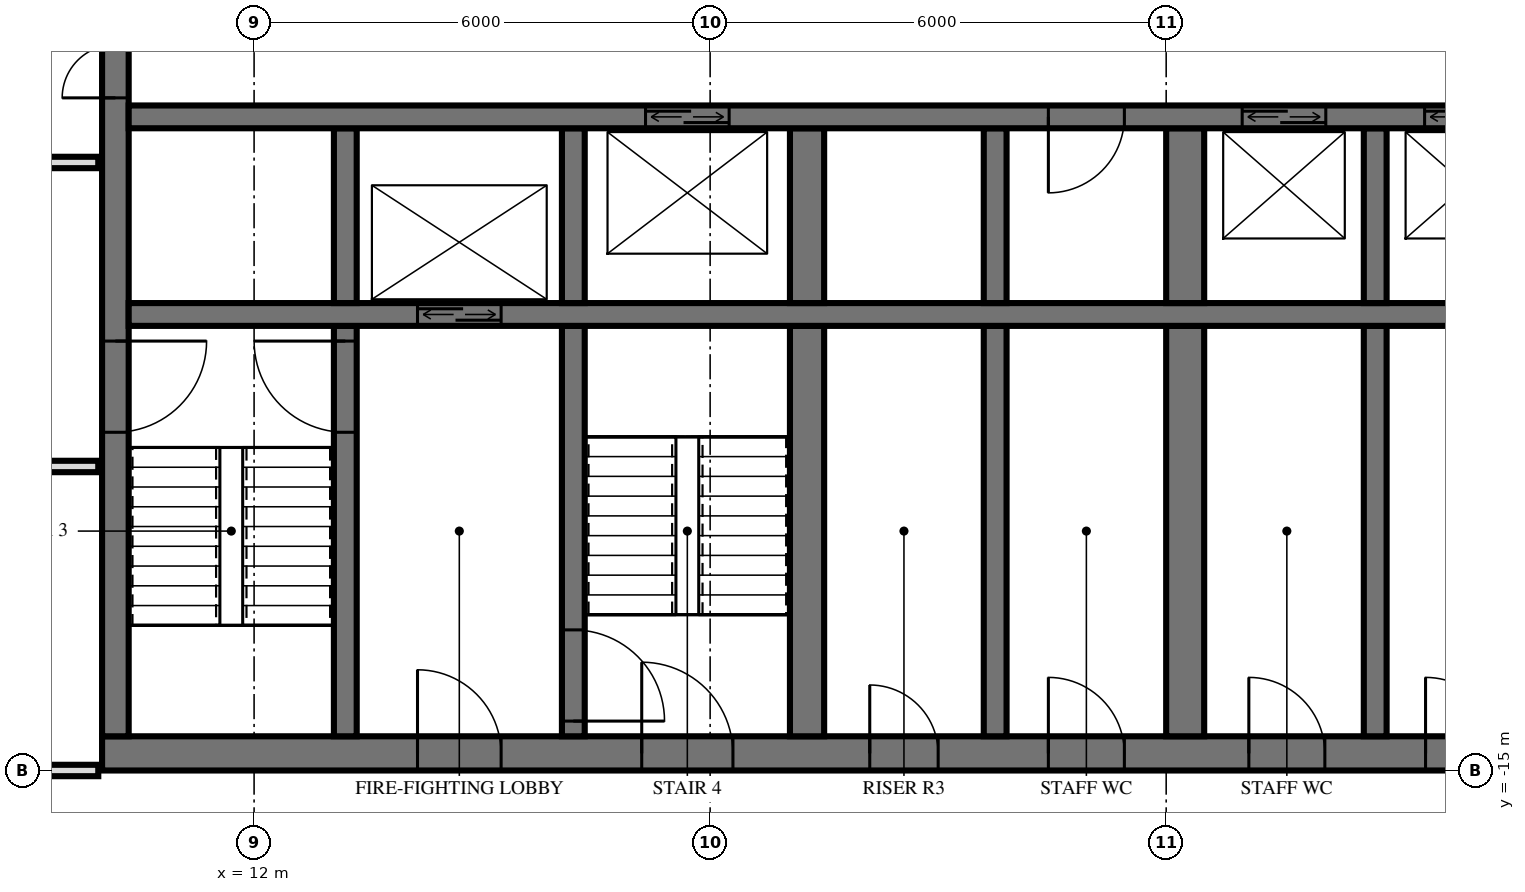
"""IFC4 building model, lengths in metres.
Left out: names, types, materials, properties, quantities, classifications, styles, units other than length and angle.
Written with IfcOpenShell. Run it as: python <this file> out.ifc"""

import sys

from ifc_helpers import new_model, si_unit, direction, frame, frame_2d, origin, place, context, subcontext, project, spatial, rectangle, extrude, element, fill, save


model = new_model("IFC4")
c1 = context("Model", 3, precision=1e-05, world=origin(), true_north=direction((0.0, 1.0)))
c2 = subcontext(c1, "Body", "Model", "MODEL_VIEW")
j1 = project(units=[si_unit("LENGTHUNIT", "METRE"), si_unit("PLANEANGLEUNIT", "RADIAN")], contexts=[c1])
p1 = place(None, origin())
s1 = spatial("IfcSite", under=j1, at=p1, CompositionType="ELEMENT")
p2 = place(p1, origin())
s2 = spatial("IfcBuilding", under=s1, at=p2, CompositionType="ELEMENT")
p3 = place(p2, frame((0.0, 0.0, 60.0)))
s3 = spatial("IfcBuildingStorey", under=s2, at=p3, CompositionType="ELEMENT", Elevation=60.0)
p4 = place(p3, frame((10.0, -14.775, 0.0), z_axis=(0.0, 0.0, 1.0), x_axis=(1.0, 0.0, 0.0)))
e1 = element("IfcWall", 1, at=p4, inside=s3, PredefinedType="SHEAR", context=c2, shape_type="SweptSolid", body=[
    extrude(rectangle(XDim=19.5, YDim=0.45, at=frame_2d((9.75, 0.0))), origin(), (0.0, 0.0, 1.0), 3.6),
])
p5 = place(p4, frame((7.1, 0.0, 0.0)))
e2 = element("IfcOpeningElement", 2, at=p5, cuts=e1, PredefinedType="OPENING", context=c2, shape_type="SweptSolid", body=[
    extrude(rectangle(XDim=1.2, YDim=2.1, at=frame_2d((0.6, 1.05))), frame((0.0, 0.235, 0.0), z_axis=(0.0, -1.0, 0.0), x_axis=(1.0, 0.0, 0.0)), (0.0, 0.0, 1.0), 0.47),
])
p6 = place(p4, frame((4.15, 0.0, 0.0)))
e3 = element("IfcOpeningElement", 3, at=p6, cuts=e1, PredefinedType="OPENING", context=c2, shape_type="SweptSolid", body=[
    extrude(rectangle(XDim=1.1, YDim=2.1, at=frame_2d((0.55, 1.05))), frame((0.0, 0.235, 0.0), z_axis=(0.0, -1.0, 0.0), x_axis=(1.0, 0.0, 0.0)), (0.0, 0.0, 1.0), 0.47),
])
p7 = place(p4, frame((10.1, 0.0, 0.0)))
e4 = element("IfcOpeningElement", 4, at=p7, cuts=e1, PredefinedType="OPENING", context=c2, shape_type="SweptSolid", body=[
    extrude(rectangle(XDim=0.9, YDim=2.1, at=frame_2d((0.45, 1.05))), frame((0.0, 0.235, 0.0), z_axis=(0.0, -1.0, 0.0), x_axis=(1.0, 0.0, 0.0)), (0.0, 0.0, 1.0), 0.47),
])
p8 = place(p4, frame((12.45, 0.0, 0.0)))
e5 = element("IfcOpeningElement", 5, at=p8, cuts=e1, PredefinedType="OPENING", context=c2, shape_type="SweptSolid", body=[
    extrude(rectangle(XDim=1.0, YDim=2.1, at=frame_2d((0.5, 1.05))), frame((0.0, 0.235, 0.0), z_axis=(0.0, -1.0, 0.0), x_axis=(1.0, 0.0, 0.0)), (0.0, 0.0, 1.0), 0.47),
])
p9 = place(p4, frame((15.087, 0.0, 0.0)))
e6 = element("IfcOpeningElement", 6, at=p9, cuts=e1, PredefinedType="OPENING", context=c2, shape_type="SweptSolid", body=[
    extrude(rectangle(XDim=1.0, YDim=2.1, at=frame_2d((0.5, 1.05))), frame((0.0, 0.235, 0.0), z_axis=(0.0, -1.0, 0.0), x_axis=(1.0, 0.0, 0.0)), (0.0, 0.0, 1.0), 0.47),
])
p10 = place(p4, frame((17.413, 0.0, 0.0)))
e7 = element("IfcOpeningElement", 7, at=p10, cuts=e1, PredefinedType="OPENING", context=c2, shape_type="SweptSolid", body=[
    extrude(rectangle(XDim=1.0, YDim=2.1, at=frame_2d((0.5, 1.05))), frame((0.0, 0.235, 0.0), z_axis=(0.0, -1.0, 0.0), x_axis=(1.0, 0.0, 0.0)), (0.0, 0.0, 1.0), 0.47),
])
p11 = place(p3, frame((10.175, -14.55, 0.0), z_axis=(0.0, 0.0, 1.0), x_axis=(0.0, 1.0, 0.0)))
e8 = element("IfcWall", 8, at=p11, inside=s3, PredefinedType="SHEAR", context=c2, shape_type="SweptSolid", body=[
    extrude(rectangle(XDim=14.1, YDim=0.35, at=frame_2d((7.05, 0.0))), origin(), (0.0, 0.0, 1.0), 3.6),
])
p12 = place(p11, frame((8.4, 0.0, 0.0)))
e9 = element("IfcOpeningElement", 9, at=p12, cuts=e8, PredefinedType="OPENING", context=c2, shape_type="SweptSolid", body=[
    extrude(rectangle(XDim=1.4, YDim=2.4, at=frame_2d((0.7, 1.2))), frame((0.0, 0.185, 0.0), z_axis=(0.0, -1.0, 0.0), x_axis=(1.0, 0.0, 0.0)), (0.0, 0.0, 1.0), 0.37),
])
p13 = place(p11, frame((10.0, 0.0, 0.0)))
e10 = element("IfcOpeningElement", 10, at=p13, cuts=e8, PredefinedType="OPENING", context=c2, shape_type="SweptSolid", body=[
    extrude(rectangle(XDim=1.4, YDim=2.4, at=frame_2d((0.7, 1.2))), frame((0.0, 0.185, 0.0), z_axis=(0.0, -1.0, 0.0), x_axis=(1.0, 0.0, 0.0)), (0.0, 0.0, 1.0), 0.37),
])
p14 = place(p11, frame((4.0, 0.0, 0.0)))
e11 = element("IfcOpeningElement", 11, at=p14, cuts=e8, PredefinedType="OPENING", context=c2, shape_type="SweptSolid", body=[
    extrude(rectangle(XDim=1.2, YDim=2.1, at=frame_2d((0.6, 1.05))), frame((0.0, 0.185, 0.0), z_axis=(0.0, -1.0, 0.0), x_axis=(1.0, 0.0, 0.0)), (0.0, 0.0, 1.0), 0.37),
])
p15 = place(p3, frame((10.35, -6.4, 0.0), z_axis=(0.0, 0.0, 1.0), x_axis=(1.0, 0.0, 0.0)))
e12 = element("IfcWall", 12, at=p15, inside=s3, PredefinedType="SHEAR", context=c2, shape_type="SweptSolid", body=[
    extrude(rectangle(XDim=18.7, YDim=0.3, at=frame_2d((9.35, 0.0))), origin(), (0.0, 0.0, 1.0), 3.6),
])
p16 = place(p15, frame((14.65, 0.0, 0.0)))
e13 = element("IfcOpeningElement", 13, at=p16, cuts=e12, PredefinedType="OPENING", context=c2, shape_type="SweptSolid", body=[
    extrude(rectangle(XDim=1.1, YDim=2.1, at=frame_2d((0.55, 1.05))), frame((0.0, 0.16, 0.0), z_axis=(0.0, -1.0, 0.0), x_axis=(1.0, 0.0, 0.0)), (0.0, 0.0, 1.0), 0.32),
])
p17 = place(p15, frame((17.05, 0.0, 0.0)))
e14 = element("IfcOpeningElement", 14, at=p17, cuts=e12, PredefinedType="OPENING", context=c2, shape_type="SweptSolid", body=[
    extrude(rectangle(XDim=1.1, YDim=2.1, at=frame_2d((0.55, 1.05))), frame((0.0, 0.16, 0.0), z_axis=(0.0, -1.0, 0.0), x_axis=(1.0, 0.0, 0.0)), (0.0, 0.0, 1.0), 0.32),
])
p18 = place(p15, frame((6.8, 0.0, 0.0)))
e15 = element("IfcOpeningElement", 15, at=p18, cuts=e12, PredefinedType="OPENING", context=c2, shape_type="SweptSolid", body=[
    extrude(rectangle(XDim=1.1, YDim=2.1, at=frame_2d((0.55, 1.05))), frame((0.0, 0.16, 0.0), z_axis=(0.0, -1.0, 0.0), x_axis=(1.0, 0.0, 0.0)), (0.0, 0.0, 1.0), 0.32),
])
p19 = place(p15, frame((12.1, 0.0, 0.0)))
e16 = element("IfcOpeningElement", 16, at=p19, cuts=e12, PredefinedType="OPENING", context=c2, shape_type="SweptSolid", body=[
    extrude(rectangle(XDim=1.0, YDim=2.1, at=frame_2d((0.5, 1.05))), frame((0.0, 0.16, 0.0), z_axis=(0.0, -1.0, 0.0), x_axis=(1.0, 0.0, 0.0)), (0.0, 0.0, 1.0), 0.32),
])
p20 = place(p3, frame((10.35, -9.0, 0.0), z_axis=(0.0, 0.0, 1.0), x_axis=(1.0, 0.0, 0.0)))
e17 = element("IfcWall", 17, at=p20, inside=s3, PredefinedType="SHEAR", context=c2, shape_type="SweptSolid", body=[
    extrude(rectangle(XDim=18.7, YDim=0.3, at=frame_2d((9.35, 0.0))), origin(), (0.0, 0.0, 1.0), 3.6),
])
p21 = place(p20, frame((3.8, 0.0, 0.0)))
e18 = element("IfcOpeningElement", 18, at=p21, cuts=e17, PredefinedType="OPENING", context=c2, shape_type="SweptSolid", body=[
    extrude(rectangle(XDim=1.1, YDim=2.1, at=frame_2d((0.55, 1.05))), frame((0.0, 0.16, 0.0), z_axis=(0.0, -1.0, 0.0), x_axis=(1.0, 0.0, 0.0)), (0.0, 0.0, 1.0), 0.32),
])
p22 = place(p3, frame((13.2, -8.85, 0.0), z_axis=(0.0, 0.0, 1.0), x_axis=(0.0, 1.0, 0.0)))
e19 = element("IfcWall", 19, at=p22, inside=s3, PredefinedType="SHEAR", context=c2, shape_type="SweptSolid", body=[
    extrude(rectangle(XDim=2.3, YDim=0.3, at=frame_2d((1.15, 0.0))), origin(), (0.0, 0.0, 1.0), 3.6),
])
p23 = place(p3, frame((13.2, -14.55, 0.0), z_axis=(0.0, 0.0, 1.0), x_axis=(0.0, 1.0, 0.0)))
e20 = element("IfcWall", 20, at=p23, inside=s3, PredefinedType="SHEAR", context=c2, shape_type="SweptSolid", body=[
    extrude(rectangle(XDim=5.4, YDim=0.3, at=frame_2d((2.7, 0.0))), origin(), (0.0, 0.0, 1.0), 3.6),
])
p24 = place(p23, frame((4.0, 0.0, 0.0)))
e21 = element("IfcOpeningElement", 21, at=p24, cuts=e20, PredefinedType="OPENING", context=c2, shape_type="SweptSolid", body=[
    extrude(rectangle(XDim=1.2, YDim=2.1, at=frame_2d((0.6, 1.05))), frame((0.0, 0.16, 0.0), z_axis=(0.0, -1.0, 0.0), x_axis=(1.0, 0.0, 0.0)), (0.0, 0.0, 1.0), 0.32),
])
p25 = place(p3, frame((16.2, -8.85, 0.0), z_axis=(0.0, 0.0, 1.0), x_axis=(0.0, 1.0, 0.0)))
e22 = element("IfcWall", 22, at=p25, inside=s3, PredefinedType="SHEAR", context=c2, shape_type="SweptSolid", body=[
    extrude(rectangle(XDim=2.3, YDim=0.3, at=frame_2d((1.15, 0.0))), origin(), (0.0, 0.0, 1.0), 3.6),
])
p26 = place(p3, frame((16.2, -14.55, 0.0), z_axis=(0.0, 0.0, 1.0), x_axis=(0.0, 1.0, 0.0)))
e23 = element("IfcWall", 23, at=p26, inside=s3, PredefinedType="SHEAR", context=c2, shape_type="SweptSolid", body=[
    extrude(rectangle(XDim=5.4, YDim=0.3, at=frame_2d((2.7, 0.0))), origin(), (0.0, 0.0, 1.0), 3.6),
])
p27 = place(p26, frame((0.2, 0.0, 0.0)))
e24 = element("IfcOpeningElement", 24, at=p27, cuts=e23, PredefinedType="OPENING", context=c2, shape_type="SweptSolid", body=[
    extrude(rectangle(XDim=1.2, YDim=2.1, at=frame_2d((0.6, 1.05))), frame((0.0, 0.16, 0.0), z_axis=(0.0, -1.0, 0.0), x_axis=(1.0, 0.0, 0.0)), (0.0, 0.0, 1.0), 0.32),
])
p28 = place(p3, frame((19.275, -8.85, 0.0), z_axis=(0.0, 0.0, 1.0), x_axis=(0.0, 1.0, 0.0)))
e25 = element("IfcWall", 25, at=p28, inside=s3, PredefinedType="SHEAR", context=c2, shape_type="SweptSolid", body=[
    extrude(rectangle(XDim=2.3, YDim=0.45, at=frame_2d((1.15, 0.0))), origin(), (0.0, 0.0, 1.0), 3.6),
])
p29 = place(p3, frame((19.275, -14.55, 0.0), z_axis=(0.0, 0.0, 1.0), x_axis=(0.0, 1.0, 0.0)))
e26 = element("IfcWall", 26, at=p29, inside=s3, PredefinedType="SHEAR", context=c2, shape_type="SweptSolid", body=[
    extrude(rectangle(XDim=5.4, YDim=0.45, at=frame_2d((2.7, 0.0))), origin(), (0.0, 0.0, 1.0), 3.6),
])
p30 = place(p3, frame((21.75, -8.85, 0.0), z_axis=(0.0, 0.0, 1.0), x_axis=(0.0, 1.0, 0.0)))
e27 = element("IfcWall", 27, at=p30, inside=s3, PredefinedType="SHEAR", context=c2, shape_type="SweptSolid", body=[
    extrude(rectangle(XDim=2.3, YDim=0.3, at=frame_2d((1.15, 0.0))), origin(), (0.0, 0.0, 1.0), 3.6),
])
p31 = place(p3, frame((21.75, -14.55, 0.0), z_axis=(0.0, 0.0, 1.0), x_axis=(0.0, 1.0, 0.0)))
e28 = element("IfcWall", 28, at=p31, inside=s3, PredefinedType="SHEAR", context=c2, shape_type="SweptSolid", body=[
    extrude(rectangle(XDim=5.4, YDim=0.3, at=frame_2d((2.7, 0.0))), origin(), (0.0, 0.0, 1.0), 3.6),
])
p32 = place(p3, frame((24.25, -8.85, 0.0), z_axis=(0.0, 0.0, 1.0), x_axis=(0.0, 1.0, 0.0)))
e29 = element("IfcWall", 29, at=p32, inside=s3, PredefinedType="SHEAR", context=c2, shape_type="SweptSolid", body=[
    extrude(rectangle(XDim=2.3, YDim=0.5, at=frame_2d((1.15, 0.0))), origin(), (0.0, 0.0, 1.0), 3.6),
])
p33 = place(p3, frame((24.25, -14.55, 0.0), z_axis=(0.0, 0.0, 1.0), x_axis=(0.0, 1.0, 0.0)))
e30 = element("IfcWall", 30, at=p33, inside=s3, PredefinedType="SHEAR", context=c2, shape_type="SweptSolid", body=[
    extrude(rectangle(XDim=5.4, YDim=0.5, at=frame_2d((2.7, 0.0))), origin(), (0.0, 0.0, 1.0), 3.6),
])
p34 = place(p3, frame((26.75, -8.85, 0.0), z_axis=(0.0, 0.0, 1.0), x_axis=(0.0, 1.0, 0.0)))
e31 = element("IfcWall", 31, at=p34, inside=s3, PredefinedType="SHEAR", context=c2, shape_type="SweptSolid", body=[
    extrude(rectangle(XDim=2.3, YDim=0.3, at=frame_2d((1.15, 0.0))), origin(), (0.0, 0.0, 1.0), 3.6),
])
p35 = place(p3, frame((26.75, -14.55, 0.0), z_axis=(0.0, 0.0, 1.0), x_axis=(0.0, 1.0, 0.0)))
e32 = element("IfcWall", 32, at=p35, inside=s3, PredefinedType="SHEAR", context=c2, shape_type="SweptSolid", body=[
    extrude(rectangle(XDim=5.4, YDim=0.3, at=frame_2d((2.7, 0.0))), origin(), (0.0, 0.0, 1.0), 3.6),
])
p36 = place(p3, frame((-9.95, -15.0, 0.0), z_axis=(0.0, 0.0, 1.0), x_axis=(1.0, 0.0, 0.0)))
e33 = element("IfcWall", 33, at=p36, inside=s3, PredefinedType="PARTITIONING", context=c2, shape_type="SweptSolid", body=[
    extrude(rectangle(XDim=19.9, YDim=0.15, at=frame_2d((9.95, 0.0))), origin(), (0.0, 0.0, 1.0), 2.684),
])
p37 = place(p36, frame((9.45, 0.0, 0.0)))
e34 = element("IfcOpeningElement", 34, at=p37, cuts=e33, PredefinedType="OPENING", context=c2, shape_type="SweptSolid", body=[
    extrude(rectangle(XDim=1.0, YDim=2.1, at=frame_2d((0.5, 1.05))), frame((0.0, 0.085, 0.0), z_axis=(0.0, -1.0, 0.0), x_axis=(1.0, 0.0, 0.0)), (0.0, 0.0, 1.0), 0.17),
])
p38 = place(p3, frame((-9.95, -11.0, 0.0), z_axis=(0.0, 0.0, 1.0), x_axis=(1.0, 0.0, 0.0)))
e35 = element("IfcWall", 35, at=p38, inside=s3, PredefinedType="PARTITIONING", context=c2, shape_type="SweptSolid", body=[
    extrude(rectangle(XDim=19.9, YDim=0.15, at=frame_2d((9.95, 0.0))), origin(), (0.0, 0.0, 1.0), 3.32),
])
p39 = place(p38, frame((9.45, 0.0, 0.0)))
e36 = element("IfcOpeningElement", 36, at=p39, cuts=e35, PredefinedType="OPENING", context=c2, shape_type="SweptSolid", body=[
    extrude(rectangle(XDim=1.0, YDim=2.1, at=frame_2d((0.5, 1.05))), frame((0.0, 0.085, 0.0), z_axis=(0.0, -1.0, 0.0), x_axis=(1.0, 0.0, 0.0)), (0.0, 0.0, 1.0), 0.17),
])
p40 = place(p38, frame((3.45, 0.0, 0.0)))
e37 = element("IfcOpeningElement", 37, at=p40, cuts=e35, PredefinedType="OPENING", context=c2, shape_type="SweptSolid", body=[
    extrude(rectangle(XDim=1.0, YDim=2.1, at=frame_2d((0.5, 1.05))), frame((0.0, 0.085, 0.0), z_axis=(0.0, -1.0, 0.0), x_axis=(1.0, 0.0, 0.0)), (0.0, 0.0, 1.0), 0.17),
])
p41 = place(p3, frame((-9.95, -7.0, 0.0), z_axis=(0.0, 0.0, 1.0), x_axis=(1.0, 0.0, 0.0)))
e38 = element("IfcWall", 38, at=p41, inside=s3, PredefinedType="PARTITIONING", context=c2, shape_type="SweptSolid", body=[
    extrude(rectangle(XDim=19.9, YDim=0.15, at=frame_2d((9.95, 0.0))), origin(), (0.0, 0.0, 1.0), 3.32),
])
p42 = place(p41, frame((9.45, 0.0, 0.0)))
e39 = element("IfcOpeningElement", 39, at=p42, cuts=e38, PredefinedType="OPENING", context=c2, shape_type="SweptSolid", body=[
    extrude(rectangle(XDim=1.0, YDim=2.1, at=frame_2d((0.5, 1.05))), frame((0.0, 0.085, 0.0), z_axis=(0.0, -1.0, 0.0), x_axis=(1.0, 0.0, 0.0)), (0.0, 0.0, 1.0), 0.17),
])
p43 = place(p41, frame((15.45, 0.0, 0.0)))
e40 = element("IfcOpeningElement", 40, at=p43, cuts=e38, PredefinedType="OPENING", context=c2, shape_type="SweptSolid", body=[
    extrude(rectangle(XDim=1.0, YDim=2.1, at=frame_2d((0.5, 1.05))), frame((0.0, 0.085, 0.0), z_axis=(0.0, -1.0, 0.0), x_axis=(1.0, 0.0, 0.0)), (0.0, 0.0, 1.0), 0.17),
])
p44 = place(p16, origin())
e41 = element("IfcDoor", 41, at=p44, inside=s3, OperationType="DOUBLE_DOOR_SLIDING", PredefinedType="USERDEFINED", context=c2, shape_type="SweptSolid", body=[
    extrude(rectangle(XDim=1.1, YDim=2.1, at=frame_2d((0.55, 1.05))), frame((0.0, 0.025, 0.0), z_axis=(0.0, -1.0, 0.0), x_axis=(1.0, 0.0, 0.0)), (0.0, 0.0, 1.0), 0.05),
])
fill(e13, e41)
p45 = place(p17, origin())
e42 = element("IfcDoor", 42, at=p45, inside=s3, OperationType="DOUBLE_DOOR_SLIDING", PredefinedType="USERDEFINED", context=c2, shape_type="SweptSolid", body=[
    extrude(rectangle(XDim=1.1, YDim=2.1, at=frame_2d((0.55, 1.05))), frame((0.0, 0.025, 0.0), z_axis=(0.0, -1.0, 0.0), x_axis=(1.0, 0.0, 0.0)), (0.0, 0.0, 1.0), 0.05),
])
fill(e14, e42)
p46 = place(p21, origin())
e43 = element("IfcDoor", 43, at=p46, inside=s3, OperationType="DOUBLE_DOOR_SLIDING", PredefinedType="USERDEFINED", context=c2, shape_type="SweptSolid", body=[
    extrude(rectangle(XDim=1.1, YDim=2.1, at=frame_2d((0.55, 1.05))), frame((0.0, 0.025, 0.0), z_axis=(0.0, -1.0, 0.0), x_axis=(1.0, 0.0, 0.0)), (0.0, 0.0, 1.0), 0.05),
])
fill(e18, e43)
p47 = place(p18, origin())
e44 = element("IfcDoor", 44, at=p47, inside=s3, OperationType="DOUBLE_DOOR_SLIDING", PredefinedType="USERDEFINED", context=c2, shape_type="SweptSolid", body=[
    extrude(rectangle(XDim=1.1, YDim=2.1, at=frame_2d((0.55, 1.05))), frame((0.0, 0.025, 0.0), z_axis=(0.0, -1.0, 0.0), x_axis=(1.0, 0.0, 0.0)), (0.0, 0.0, 1.0), 0.05),
])
fill(e15, e44)
p48 = place(p12, origin())
e45 = element("IfcDoor", 45, at=p48, inside=s3, OperationType="DOUBLE_DOOR_SINGLE_SWING", PredefinedType="DOOR", context=c2, shape_type="SweptSolid", body=[
    extrude(rectangle(XDim=1.4, YDim=2.4, at=frame_2d((0.7, 1.2))), frame((0.0, 0.025, 0.0), z_axis=(0.0, -1.0, 0.0), x_axis=(1.0, 0.0, 0.0)), (0.0, 0.0, 1.0), 0.05),
])
fill(e9, e45)
p49 = place(p14, frame((0.6, 0.0, 0.0), z_axis=(0.0, 0.0, 1.0), x_axis=(-1.0, 0.0, 0.0)))
e46 = element("IfcDoor", 46, at=p49, inside=s3, OperationType="SINGLE_SWING_RIGHT", PredefinedType="DOOR", context=c2, shape_type="SweptSolid", body=[
    extrude(rectangle(XDim=1.2, YDim=2.1, at=frame_2d((0.0, 1.05))), frame((0.0, -0.025, 0.0), z_axis=(0.0, 1.0, 0.0), x_axis=(-1.0, 0.0, 0.0)), (0.0, 0.0, 1.0), 0.05),
])
fill(e11, e46)
p50 = place(p5, origin())
e47 = element("IfcDoor", 47, at=p50, inside=s3, OperationType="SINGLE_SWING_RIGHT", PredefinedType="DOOR", context=c2, shape_type="SweptSolid", body=[
    extrude(rectangle(XDim=1.2, YDim=2.1, at=frame_2d((0.6, 1.05))), frame((0.0, 0.025, 0.0), z_axis=(0.0, -1.0, 0.0), x_axis=(1.0, 0.0, 0.0)), (0.0, 0.0, 1.0), 0.05),
])
fill(e2, e47)
p51 = place(p6, origin())
e48 = element("IfcDoor", 48, at=p51, inside=s3, OperationType="SINGLE_SWING_RIGHT", PredefinedType="DOOR", context=c2, shape_type="SweptSolid", body=[
    extrude(rectangle(XDim=1.1, YDim=2.1, at=frame_2d((0.55, 1.05))), frame((0.0, 0.025, 0.0), z_axis=(0.0, -1.0, 0.0), x_axis=(1.0, 0.0, 0.0)), (0.0, 0.0, 1.0), 0.05),
])
fill(e3, e48)
p52 = place(p7, origin())
e49 = element("IfcDoor", 49, at=p52, inside=s3, OperationType="SINGLE_SWING_RIGHT", PredefinedType="DOOR", context=c2, shape_type="SweptSolid", body=[
    extrude(rectangle(XDim=0.9, YDim=2.1, at=frame_2d((0.45, 1.05))), frame((0.0, 0.025, 0.0), z_axis=(0.0, -1.0, 0.0), x_axis=(1.0, 0.0, 0.0)), (0.0, 0.0, 1.0), 0.05),
])
fill(e4, e49)
p53 = place(p8, origin())
e50 = element("IfcDoor", 50, at=p53, inside=s3, OperationType="SINGLE_SWING_RIGHT", PredefinedType="DOOR", context=c2, shape_type="SweptSolid", body=[
    extrude(rectangle(XDim=1.0, YDim=2.1, at=frame_2d((0.5, 1.05))), frame((0.0, 0.025, 0.0), z_axis=(0.0, -1.0, 0.0), x_axis=(1.0, 0.0, 0.0)), (0.0, 0.0, 1.0), 0.05),
])
fill(e5, e50)
p54 = place(p9, origin())
e51 = element("IfcDoor", 51, at=p54, inside=s3, OperationType="SINGLE_SWING_RIGHT", PredefinedType="DOOR", context=c2, shape_type="SweptSolid", body=[
    extrude(rectangle(XDim=1.0, YDim=2.1, at=frame_2d((0.5, 1.05))), frame((0.0, 0.025, 0.0), z_axis=(0.0, -1.0, 0.0), x_axis=(1.0, 0.0, 0.0)), (0.0, 0.0, 1.0), 0.05),
])
fill(e6, e51)
p55 = place(p10, origin())
e52 = element("IfcDoor", 52, at=p55, inside=s3, OperationType="SINGLE_SWING_RIGHT", PredefinedType="DOOR", context=c2, shape_type="SweptSolid", body=[
    extrude(rectangle(XDim=1.0, YDim=2.1, at=frame_2d((0.5, 1.05))), frame((0.0, 0.025, 0.0), z_axis=(0.0, -1.0, 0.0), x_axis=(1.0, 0.0, 0.0)), (0.0, 0.0, 1.0), 0.05),
])
fill(e7, e52)
p56 = place(p19, frame((0.5, 0.0, 0.0), z_axis=(0.0, 0.0, 1.0), x_axis=(-1.0, 0.0, 0.0)))
e53 = element("IfcDoor", 53, at=p56, inside=s3, OperationType="SINGLE_SWING_LEFT", PredefinedType="DOOR", context=c2, shape_type="SweptSolid", body=[
    extrude(rectangle(XDim=1.0, YDim=2.1, at=frame_2d((0.0, 1.05))), frame((0.0, -0.025, 0.0), z_axis=(0.0, 1.0, 0.0), x_axis=(-1.0, 0.0, 0.0)), (0.0, 0.0, 1.0), 0.05),
])
fill(e16, e53)
p57 = place(p24, origin())
e54 = element("IfcDoor", 54, at=p57, inside=s3, OperationType="SINGLE_SWING_LEFT", PredefinedType="DOOR", context=c2, shape_type="SweptSolid", body=[
    extrude(rectangle(XDim=1.2, YDim=2.1, at=frame_2d((0.6, 1.05))), frame((0.0, 0.025, 0.0), z_axis=(0.0, -1.0, 0.0), x_axis=(1.0, 0.0, 0.0)), (0.0, 0.0, 1.0), 0.05),
])
fill(e21, e54)
p58 = place(p27, frame((0.6, 0.0, 0.0), z_axis=(0.0, 0.0, 1.0), x_axis=(-1.0, 0.0, 0.0)))
e55 = element("IfcDoor", 55, at=p58, inside=s3, OperationType="SINGLE_SWING_LEFT", PredefinedType="DOOR", context=c2, shape_type="SweptSolid", body=[
    extrude(rectangle(XDim=1.2, YDim=2.1, at=frame_2d((0.0, 1.05))), frame((0.0, -0.025, 0.0), z_axis=(0.0, 1.0, 0.0), x_axis=(-1.0, 0.0, 0.0)), (0.0, 0.0, 1.0), 0.05),
])
fill(e24, e55)
save(model, sys.argv[1])
